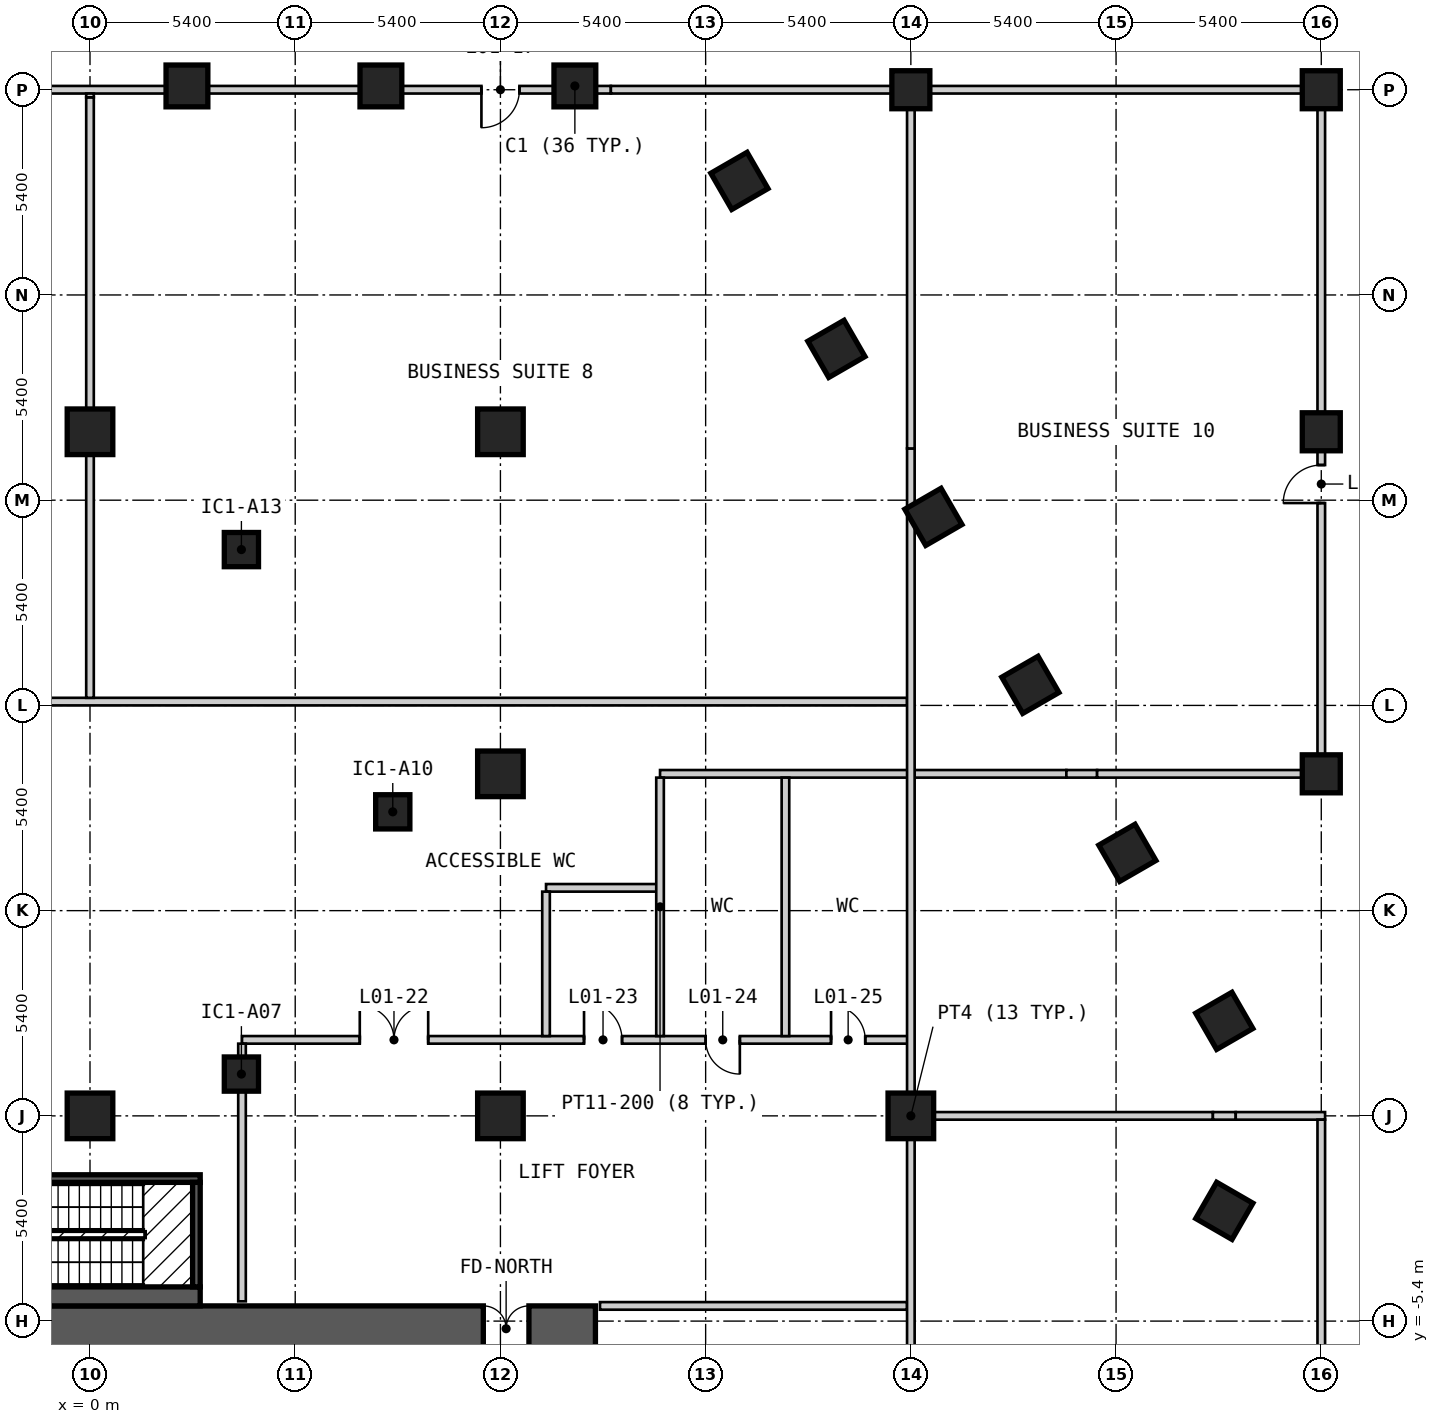
"""IFC4 building model, lengths in metres.
Left out: names, types, materials, properties, quantities, classifications, styles, units other than length and angle.
Written with IfcOpenShell. Run it as: python <this file> out.ifc"""

import sys

from ifc_helpers import new_model, si_unit, direction, frame, frame_2d, origin, origin_2d, place, context, subcontext, project, spatial, rectangle, extrude, element, fill, save


model = new_model("IFC4")
c1 = context("Model", 3, precision=1e-05, world=origin(), true_north=direction((0.0, 1.0)))
c2 = subcontext(c1, "Body", "Model", "MODEL_VIEW")
j1 = project(units=[si_unit("LENGTHUNIT", "METRE"), si_unit("PLANEANGLEUNIT", "RADIAN")], contexts=[c1])
p1 = place(None, origin())
s1 = spatial("IfcSite", under=j1, at=p1, CompositionType="ELEMENT")
p2 = place(p1, origin())
s2 = spatial("IfcBuilding", under=s1, at=p2, CompositionType="ELEMENT")
p3 = place(p2, frame((0.0, 0.0, 5.0)))
s3 = spatial("IfcBuildingStorey", under=s2, at=p3, CompositionType="ELEMENT", Elevation=5.0)
for number, where, z_axis, x_axis in (
    (1, (12.759, 27.1, 0.0), (0.0, 0.0, 1.0), (-1.0, 0.0, 0.0)),
    (2, (7.655, 27.1, 0.0), (0.0, 0.0, 1.0), (-1.0, 0.0, 0.0)),
    (3, (2.551, 27.1, 0.0), (0.0, 0.0, 1.0), (-1.0, 0.0, 0.0)),
    (4, (29.849, -2.499, 0.0), (0.0, 0.0, 1.0), (0.5, 0.866, 0.0)),
    (5, (29.848, 2.5, 0.0), (0.0, 0.0, 1.0), (-0.5, 0.866, 0.0)),
    (6, (27.297, 6.921, 0.0), (0.0, 0.0, 1.0), (-0.5, 0.866, 0.0)),
    (7, (24.745, 11.341, 0.0), (0.0, 0.0, 1.0), (-0.5, 0.866, 0.0)),
    (8, (22.193, 15.761, 0.0), (0.0, 0.0, 1.0), (-0.5, 0.866, 0.0)),
    (9, (19.641, 20.181, 0.0), (0.0, 0.0, 1.0), (-0.5, 0.866, 0.0)),
    (10, (17.089, 24.601, 0.0), (0.0, 0.0, 1.0), (-0.5, 0.866, 0.0)),
):
    element("IfcColumn", number, at=place(p3, frame(where, z_axis=z_axis, x_axis=x_axis)), inside=s3, PredefinedType="COLUMN", context=c2, shape_type="SweptSolid", body=[
        extrude(rectangle(XDim=1.1, YDim=1.1, at=origin_2d()), origin(), (0.0, 0.0, 1.0), 4.0),
    ])
for number, where, z_axis, x_axis in (
    (11, (3.984, 1.1, 0.0), (0.0, 0.0, 1.0), (1.0, 0.0, 0.0)),
    (12, (7.967, 8.0, 0.0), (0.0, 0.0, 1.0), (1.0, 0.0, 0.0)),
    (13, (3.984, 14.9, 0.0), (0.0, 0.0, 1.0), (1.0, 0.0, 0.0)),
):
    element("IfcColumn", number, at=place(p3, frame(where, z_axis=z_axis, x_axis=x_axis)), inside=s3, PredefinedType="COLUMN", context=c2, shape_type="SweptSolid", body=[
        extrude(rectangle(XDim=0.9, YDim=0.9, at=origin_2d()), origin(), (0.0, 0.0, 1.0), 4.0),
    ])
for number, where, z_axis, x_axis in (
    (14, (0.0, 0.0, 0.0), (0.0, 0.0, 1.0), (1.0, 0.0, 0.0)),
    (15, (0.0, 18.0, 0.0), (0.0, 0.0, 1.0), (1.0, 0.0, 0.0)),
    (16, (10.8, 0.0, 0.0), (0.0, 0.0, 1.0), (1.0, 0.0, 0.0)),
    (17, (10.8, 9.0, 0.0), (0.0, 0.0, 1.0), (1.0, 0.0, 0.0)),
    (18, (10.8, 18.0, 0.0), (0.0, 0.0, 1.0), (1.0, 0.0, 0.0)),
    (19, (21.6, 0.0, 0.0), (0.0, 0.0, 1.0), (1.0, 0.0, 0.0)),
):
    element("IfcColumn", number, at=place(p3, frame(where, z_axis=z_axis, x_axis=x_axis)), inside=s3, PredefinedType="COLUMN", context=c2, shape_type="SweptSolid", body=[
        extrude(rectangle(XDim=1.2, YDim=1.2, at=origin_2d()), origin(), (0.0, 0.0, 1.0), 4.0),
    ])
for number, where, z_axis, x_axis in (
    (20, (21.6, 27.0, 0.0), (0.0, 0.0, 1.0), (1.0, 0.0, 0.0)),
    (21, (32.4, 9.0, 0.0), (0.0, 0.0, 1.0), (1.0, 0.0, 0.0)),
    (22, (32.4, 18.0, 0.0), (0.0, 0.0, 1.0), (1.0, 0.0, 0.0)),
    (23, (32.4, 27.0, 0.0), (0.0, 0.0, 1.0), (1.0, 0.0, 0.0)),
):
    element("IfcColumn", number, at=place(p3, frame(where, z_axis=z_axis, x_axis=x_axis)), inside=s3, PredefinedType="COLUMN", context=c2, shape_type="SweptSolid", body=[
        extrude(rectangle(XDim=1.0, YDim=1.0, at=origin_2d()), origin(), (0.0, 0.0, 1.0), 4.0),
    ])
p4 = place(p3, frame((-13.3, -5.6, 0.0), z_axis=(0.0, 0.0, 1.0), x_axis=(1.0, 0.0, 0.0)))
e24 = element("IfcWall", 24, at=p4, inside=s3, PredefinedType="SHEAR", context=c2, shape_type="SweptSolid", body=[
    extrude(rectangle(XDim=26.6, YDim=1.2, at=frame_2d((13.3, 0.0))), origin(), (0.0, 0.0, 1.0), 3.5),
])
p5 = place(p4, frame((23.65, 0.0, 0.0)))
e25 = element("IfcOpeningElement", 25, at=p5, cuts=e24, PredefinedType="OPENING", context=c2, shape_type="SweptSolid", body=[
    extrude(rectangle(XDim=1.2, YDim=2.1, at=frame_2d((0.6, 1.05))), frame((0.0, 0.61, 0.0), z_axis=(0.0, -1.0, 0.0), x_axis=(1.0, 0.0, 0.0)), (0.0, 0.0, 1.0), 1.22),
])
p6 = place(p3, frame((-2.9, -4.75, 0.0), z_axis=(0.0, 0.0, 1.0), x_axis=(1.0, 0.0, 0.0)))
e26 = element("IfcWall", 26, at=p6, inside=s3, PredefinedType="SOLIDWALL", context=c2, shape_type="SweptSolid", body=[
    extrude(rectangle(XDim=5.8, YDim=0.5, at=frame_2d((2.9, 0.0))), origin(), (0.0, 0.0, 1.0), 3.5),
])
p7 = place(p3, frame((-2.9, -1.65, 0.0), z_axis=(0.0, 0.0, 1.0), x_axis=(1.0, 0.0, 0.0)))
e27 = element("IfcWall", 27, at=p7, inside=s3, PredefinedType="SOLIDWALL", context=c2, shape_type="SweptSolid", body=[
    extrude(rectangle(XDim=5.8, YDim=0.2, at=frame_2d((2.9, 0.0))), origin(), (0.0, 0.0, 1.0), 3.5),
])
p8 = place(p7, frame((0.3, 0.0, 0.0)))
e28 = element("IfcOpeningElement", 28, at=p8, cuts=e27, PredefinedType="OPENING", context=c2, shape_type="SweptSolid", body=[
    extrude(rectangle(XDim=1.2, YDim=2.1, at=frame_2d((0.6, 1.05))), frame((0.0, 0.11, 0.0), z_axis=(0.0, -1.0, 0.0), x_axis=(1.0, 0.0, 0.0)), (0.0, 0.0, 1.0), 0.22),
])
p9 = place(p3, frame((2.8, -4.5, 0.0), z_axis=(0.0, 0.0, 1.0), x_axis=(0.0, 1.0, 0.0)))
e29 = element("IfcWall", 29, at=p9, inside=s3, PredefinedType="SOLIDWALL", context=c2, shape_type="SweptSolid", body=[
    extrude(rectangle(XDim=2.75, YDim=0.2, at=frame_2d((1.375, 0.0))), origin(), (0.0, 0.0, 1.0), 3.5),
])
p10 = place(p3, frame((13.42, -5.0, 0.0), z_axis=(0.0, 0.0, 1.0), x_axis=(1.0, 0.0, 0.0)))
e30 = element("IfcWall", 30, at=p10, inside=s3, PredefinedType="PARTITIONING", context=c2, shape_type="SweptSolid", body=[
    extrude(rectangle(XDim=8.08, YDim=0.2, at=frame_2d((4.04, 0.0))), origin(), (0.0, 0.0, 1.0), 3.5),
])
p11 = place(p3, frame((21.7, 0.0, 0.0), z_axis=(0.0, 0.0, 1.0), x_axis=(1.0, 0.0, 0.0)))
e31 = element("IfcWall", 31, at=p11, inside=s3, PredefinedType="PARTITIONING", context=c2, shape_type="SweptSolid", body=[
    extrude(rectangle(XDim=7.848, YDim=0.2, at=frame_2d((3.924, 0.0))), origin(), (0.0, 0.0, 1.0), 3.5),
])
p12 = place(p3, frame((29.548, 0.0, 0.0), z_axis=(0.0, 0.0, 1.0), x_axis=(1.0, 0.0, 0.0)))
e32 = element("IfcWall", 32, at=p12, inside=s3, PredefinedType="PARTITIONING", context=c2, shape_type="SweptSolid", body=[
    extrude(rectangle(XDim=0.601, YDim=0.2, at=frame_2d((0.3, 0.0))), origin(), (0.0, 0.0, 1.0), 2.77),
])
p13 = place(p3, frame((30.149, 0.0, 0.0), z_axis=(0.0, 0.0, 1.0), x_axis=(1.0, 0.0, 0.0)))
e33 = element("IfcWall", 33, at=p13, inside=s3, PredefinedType="PARTITIONING", context=c2, shape_type="SweptSolid", body=[
    extrude(rectangle(XDim=2.351, YDim=0.2, at=frame_2d((1.176, 0.0))), origin(), (0.0, 0.0, 1.0), 3.5),
])
p14 = place(p3, frame((4.0, 2.0, 0.0), z_axis=(0.0, 0.0, 1.0), x_axis=(1.0, 0.0, 0.0)))
e34 = element("IfcWall", 34, at=p14, inside=s3, PredefinedType="PARTITIONING", context=c2, shape_type="SweptSolid", body=[
    extrude(rectangle(XDim=17.6, YDim=0.2, at=frame_2d((8.8, 0.0))), origin(), (0.0, 0.0, 1.0), 3.5),
])
p15 = place(p14, frame((3.099, 0.0, 0.0)))
e35 = element("IfcOpeningElement", 35, at=p15, cuts=e34, PredefinedType="OPENING", context=c2, shape_type="SweptSolid", body=[
    extrude(rectangle(XDim=1.8, YDim=2.1, at=frame_2d((0.9, 1.05))), frame((0.0, 0.11, 0.0), z_axis=(0.0, -1.0, 0.0), x_axis=(1.0, 0.0, 0.0)), (0.0, 0.0, 1.0), 0.22),
])
p16 = place(p14, frame((9.0, 0.0, 0.0)))
e36 = element("IfcOpeningElement", 36, at=p16, cuts=e34, PredefinedType="OPENING", context=c2, shape_type="SweptSolid", body=[
    extrude(rectangle(XDim=1.0, YDim=2.1, at=frame_2d((0.5, 1.05))), frame((0.0, 0.11, 0.0), z_axis=(0.0, -1.0, 0.0), x_axis=(1.0, 0.0, 0.0)), (0.0, 0.0, 1.0), 0.22),
])
p17 = place(p14, frame((12.2, 0.0, 0.0)))
e37 = element("IfcOpeningElement", 37, at=p17, cuts=e34, PredefinedType="OPENING", context=c2, shape_type="SweptSolid", body=[
    extrude(rectangle(XDim=0.9, YDim=2.1, at=frame_2d((0.45, 1.05))), frame((0.0, 0.11, 0.0), z_axis=(0.0, -1.0, 0.0), x_axis=(1.0, 0.0, 0.0)), (0.0, 0.0, 1.0), 0.22),
])
p18 = place(p14, frame((15.5, 0.0, 0.0)))
e38 = element("IfcOpeningElement", 38, at=p18, cuts=e34, PredefinedType="OPENING", context=c2, shape_type="SweptSolid", body=[
    extrude(rectangle(XDim=0.9, YDim=2.1, at=frame_2d((0.45, 1.05))), frame((0.0, 0.11, 0.0), z_axis=(0.0, -1.0, 0.0), x_axis=(1.0, 0.0, 0.0)), (0.0, 0.0, 1.0), 0.22),
])
p19 = place(p3, frame((12.0, 6.0, 0.0), z_axis=(0.0, 0.0, 1.0), x_axis=(1.0, 0.0, 0.0)))
e39 = element("IfcWall", 39, at=p19, inside=s3, PredefinedType="PARTITIONING", context=c2, shape_type="SweptSolid", body=[
    extrude(rectangle(XDim=3.0, YDim=0.2, at=frame_2d((1.5, 0.0))), origin(), (0.0, 0.0, 1.0), 3.5),
])
p20 = place(p3, frame((15.0, 9.0, 0.0), z_axis=(0.0, 0.0, 1.0), x_axis=(1.0, 0.0, 0.0)))
e40 = element("IfcWall", 40, at=p20, inside=s3, PredefinedType="PARTITIONING", context=c2, shape_type="SweptSolid", body=[
    extrude(rectangle(XDim=6.6, YDim=0.2, at=frame_2d((3.3, 0.0))), origin(), (0.0, 0.0, 1.0), 3.5),
])
p21 = place(p3, frame((21.7, 9.0, 0.0), z_axis=(0.0, 0.0, 1.0), x_axis=(1.0, 0.0, 0.0)))
e41 = element("IfcWall", 41, at=p21, inside=s3, PredefinedType="PARTITIONING", context=c2, shape_type="SweptSolid", body=[
    extrude(rectangle(XDim=3.992, YDim=0.2, at=frame_2d((1.996, 0.0))), origin(), (0.0, 0.0, 1.0), 3.5),
])
p22 = place(p3, frame((25.692, 9.0, 0.0), z_axis=(0.0, 0.0, 1.0), x_axis=(1.0, 0.0, 0.0)))
e42 = element("IfcWall", 42, at=p22, inside=s3, PredefinedType="PARTITIONING", context=c2, shape_type="SweptSolid", body=[
    extrude(rectangle(XDim=0.809, YDim=0.2, at=frame_2d((0.405, 0.0))), origin(), (0.0, 0.0, 1.0), 2.77),
])
p23 = place(p3, frame((26.501, 9.0, 0.0), z_axis=(0.0, 0.0, 1.0), x_axis=(1.0, 0.0, 0.0)))
e43 = element("IfcWall", 43, at=p23, inside=s3, PredefinedType="PARTITIONING", context=c2, shape_type="SweptSolid", body=[
    extrude(rectangle(XDim=5.999, YDim=0.2, at=frame_2d((3.0, 0.0))), origin(), (0.0, 0.0, 1.0), 3.5),
])
p24 = place(p3, frame((-21.5, 10.9, 0.0), z_axis=(0.0, 0.0, 1.0), x_axis=(1.0, 0.0, 0.0)))
e44 = element("IfcWall", 44, at=p24, inside=s3, PredefinedType="PARTITIONING", context=c2, shape_type="SweptSolid", body=[
    extrude(rectangle(XDim=43.0, YDim=0.2, at=frame_2d((21.5, 0.0))), origin(), (0.0, 0.0, 1.0), 3.5),
])
for number, where, z_axis, x_axis in (
    (45, (-2.553, 27.0, 0.0), (0.0, 0.0, 1.0), (1.0, 0.0, 0.0)),
    (46, (2.551, 27.0, 0.0), (0.0, 0.0, 1.0), (1.0, 0.0, 0.0)),
):
    element("IfcWall", number, at=place(p3, frame(where, z_axis=z_axis, x_axis=x_axis)), inside=s3, PredefinedType="PARTITIONING", context=c2, shape_type="SweptSolid", body=[
        extrude(rectangle(XDim=5.104, YDim=0.2, at=frame_2d((2.552, 0.0))), origin(), (0.0, 0.0, 1.0), 2.77),
    ])
p25 = place(p3, frame((7.655, 27.0, 0.0), z_axis=(0.0, 0.0, 1.0), x_axis=(1.0, 0.0, 0.0)))
e47 = element("IfcWall", 47, at=p25, inside=s3, PredefinedType="PARTITIONING", context=c2, shape_type="SweptSolid", body=[
    extrude(rectangle(XDim=4.989, YDim=0.2, at=frame_2d((2.495, 0.0))), origin(), (0.0, 0.0, 1.0), 2.77),
])
p26 = place(p25, frame((3.645, 0.0, 0.0), z_axis=(0.0, 0.0, 1.0), x_axis=(-1.0, 0.0, 0.0)))
e48 = element("IfcOpeningElement", 48, at=p26, cuts=e47, PredefinedType="OPENING", context=c2, shape_type="SweptSolid", body=[
    extrude(rectangle(XDim=1.0, YDim=2.1, at=frame_2d((0.5, 1.05))), frame((0.0, 0.11, 0.0), z_axis=(0.0, -1.0, 0.0), x_axis=(1.0, 0.0, 0.0)), (0.0, 0.0, 1.0), 0.22),
])
p27 = place(p3, frame((12.644, 27.0, 0.0), z_axis=(0.0, 0.0, 1.0), x_axis=(1.0, 0.0, 0.0)))
e49 = element("IfcWall", 49, at=p27, inside=s3, PredefinedType="PARTITIONING", context=c2, shape_type="SweptSolid", body=[
    extrude(rectangle(XDim=0.115, YDim=0.2, at=frame_2d((0.058, 0.0))), origin(), (0.0, 0.0, 1.0), 2.77),
])
p28 = place(p3, frame((12.759, 27.0, 0.0), z_axis=(0.0, 0.0, 1.0), x_axis=(1.0, 0.0, 0.0)))
e50 = element("IfcWall", 50, at=p28, inside=s3, PredefinedType="PARTITIONING", context=c2, shape_type="SweptSolid", body=[
    extrude(rectangle(XDim=0.947, YDim=0.2, at=frame_2d((0.474, 0.0))), origin(), (0.0, 0.0, 1.0), 2.77),
])
p29 = place(p3, frame((13.706, 27.0, 0.0), z_axis=(0.0, 0.0, 1.0), x_axis=(1.0, 0.0, 0.0)))
e51 = element("IfcWall", 51, at=p29, inside=s3, PredefinedType="PARTITIONING", context=c2, shape_type="SweptSolid", body=[
    extrude(rectangle(XDim=18.794, YDim=0.2, at=frame_2d((9.397, 0.0))), origin(), (0.0, 0.0, 1.0), 3.5),
])
p30 = place(p3, frame((0.0, 11.0, 0.0), z_axis=(0.0, 0.0, 1.0), x_axis=(0.0, 1.0, 0.0)))
e52 = element("IfcWall", 52, at=p30, inside=s3, PredefinedType="PARTITIONING", context=c2, shape_type="SweptSolid", body=[
    extrude(rectangle(XDim=15.8, YDim=0.2, at=frame_2d((7.9, 0.0))), origin(), (0.0, 0.0, 1.0), 3.5),
])
p31 = place(p3, frame((0.0, 26.8, 0.0), z_axis=(0.0, 0.0, 1.0), x_axis=(0.0, 1.0, 0.0)))
e53 = element("IfcWall", 53, at=p31, inside=s3, PredefinedType="PARTITIONING", context=c2, shape_type="SweptSolid", body=[
    extrude(rectangle(XDim=0.1, YDim=0.2, at=frame_2d((0.05, 0.0))), origin(), (0.0, 0.0, 1.0), 2.77),
])
p32 = place(p3, frame((4.0, -4.88, 0.0), z_axis=(0.0, 0.0, 1.0), x_axis=(0.0, 1.0, 0.0)))
e54 = element("IfcWall", 54, at=p32, inside=s3, PredefinedType="PARTITIONING", context=c2, shape_type="SweptSolid", body=[
    extrude(rectangle(XDim=6.78, YDim=0.2, at=frame_2d((3.39, 0.0))), origin(), (0.0, 0.0, 1.0), 3.5),
])
p33 = place(p3, frame((12.0, 2.1, 0.0), z_axis=(0.0, 0.0, 1.0), x_axis=(0.0, 1.0, 0.0)))
e55 = element("IfcWall", 55, at=p33, inside=s3, PredefinedType="PARTITIONING", context=c2, shape_type="SweptSolid", body=[
    extrude(rectangle(XDim=3.8, YDim=0.2, at=frame_2d((1.9, 0.0))), origin(), (0.0, 0.0, 1.0), 3.5),
])
for number, where, z_axis, x_axis in (
    (56, (15.0, 2.1, 0.0), (0.0, 0.0, 1.0), (0.0, 1.0, 0.0)),
    (57, (18.3, 2.1, 0.0), (0.0, 0.0, 1.0), (0.0, 1.0, 0.0)),
):
    element("IfcWall", number, at=place(p3, frame(where, z_axis=z_axis, x_axis=x_axis)), inside=s3, PredefinedType="PARTITIONING", context=c2, shape_type="SweptSolid", body=[
        extrude(rectangle(XDim=6.8, YDim=0.2, at=frame_2d((3.4, 0.0))), origin(), (0.0, 0.0, 1.0), 3.5),
    ])
p34 = place(p3, frame((21.6, -16.015, 0.0), z_axis=(0.0, 0.0, 1.0), x_axis=(0.0, 1.0, 0.0)))
e58 = element("IfcWall", 58, at=p34, inside=s3, PredefinedType="PARTITIONING", context=c2, shape_type="SweptSolid", body=[
    extrude(rectangle(XDim=32.03, YDim=0.2, at=frame_2d((16.015, 0.0))), origin(), (0.0, 0.0, 1.0), 3.5),
])
p35 = place(p3, frame((21.6, 16.015, 0.0), z_axis=(0.0, 0.0, 1.0), x_axis=(0.0, 1.0, 0.0)))
e59 = element("IfcWall", 59, at=p35, inside=s3, PredefinedType="PARTITIONING", context=c2, shape_type="SweptSolid", body=[
    extrude(rectangle(XDim=1.546, YDim=0.2, at=frame_2d((0.773, 0.0))), origin(), (0.0, 0.0, 1.0), 2.77),
])
p36 = place(p3, frame((21.6, 17.561, 0.0), z_axis=(0.0, 0.0, 1.0), x_axis=(0.0, 1.0, 0.0)))
e60 = element("IfcWall", 60, at=p36, inside=s3, PredefinedType="PARTITIONING", context=c2, shape_type="SweptSolid", body=[
    extrude(rectangle(XDim=9.339, YDim=0.2, at=frame_2d((4.669, 0.0))), origin(), (0.0, 0.0, 1.0), 3.5),
])
p37 = place(p3, frame((32.4, -26.2, 0.0), z_axis=(0.0, 0.0, 1.0), x_axis=(0.0, 1.0, 0.0)))
e61 = element("IfcWall", 61, at=p37, inside=s3, PredefinedType="PARTITIONING", context=c2, shape_type="SweptSolid", body=[
    extrude(rectangle(XDim=26.1, YDim=0.2, at=frame_2d((13.05, 0.0))), origin(), (0.0, 0.0, 1.0), 3.5),
])
p38 = place(p37, frame((15.323, 0.0, 0.0)))
e62 = element("IfcOpeningElement", 62, at=p38, cuts=e61, PredefinedType="OPENING", context=c2, shape_type="SweptSolid", body=[
    extrude(rectangle(XDim=1.0, YDim=2.1, at=frame_2d((0.5, 1.05))), frame((0.0, 0.11, 0.0), z_axis=(0.0, -1.0, 0.0), x_axis=(1.0, 0.0, 0.0)), (0.0, 0.0, 1.0), 0.22),
])
p39 = place(p3, frame((32.4, 9.1, 0.0), z_axis=(0.0, 0.0, 1.0), x_axis=(0.0, 1.0, 0.0)))
e63 = element("IfcWall", 63, at=p39, inside=s3, PredefinedType="PARTITIONING", context=c2, shape_type="SweptSolid", body=[
    extrude(rectangle(XDim=17.8, YDim=0.2, at=frame_2d((8.9, 0.0))), origin(), (0.0, 0.0, 1.0), 3.5),
])
p40 = place(p39, frame((7.025, 0.0, 0.0)))
e64 = element("IfcOpeningElement", 64, at=p40, cuts=e63, PredefinedType="OPENING", context=c2, shape_type="SweptSolid", body=[
    extrude(rectangle(XDim=1.0, YDim=2.1, at=frame_2d((0.5, 1.05))), frame((0.0, 0.11, 0.0), z_axis=(0.0, -1.0, 0.0), x_axis=(1.0, 0.0, 0.0)), (0.0, 0.0, 1.0), 0.22),
])
p41 = place(p26, origin())
e65 = element("IfcDoor", 65, at=p41, inside=s3, OperationType="SINGLE_SWING_RIGHT", PredefinedType="DOOR", context=c2, shape_type="SweptSolid", body=[
    extrude(rectangle(XDim=1.0, YDim=2.1, at=frame_2d((0.5, 1.05))), frame((0.0, 0.025, 0.0), z_axis=(0.0, -1.0, 0.0), x_axis=(1.0, 0.0, 0.0)), (0.0, 0.0, 1.0), 0.05),
])
fill(e48, e65)
p42 = place(p40, origin())
e66 = element("IfcDoor", 66, at=p42, inside=s3, OperationType="SINGLE_SWING_LEFT", PredefinedType="DOOR", context=c2, shape_type="SweptSolid", body=[
    extrude(rectangle(XDim=1.0, YDim=2.1, at=frame_2d((0.5, 1.05))), frame((0.0, 0.025, 0.0), z_axis=(0.0, -1.0, 0.0), x_axis=(1.0, 0.0, 0.0)), (0.0, 0.0, 1.0), 0.05),
])
fill(e64, e66)
p43 = place(p15, origin())
e67 = element("IfcDoor", 67, at=p43, inside=s3, OperationType="DOUBLE_DOOR_SINGLE_SWING", PredefinedType="DOOR", context=c2, shape_type="SweptSolid", body=[
    extrude(rectangle(XDim=1.8, YDim=2.1, at=frame_2d((0.9, 1.05))), frame((0.0, 0.025, 0.0), z_axis=(0.0, -1.0, 0.0), x_axis=(1.0, 0.0, 0.0)), (0.0, 0.0, 1.0), 0.05),
])
fill(e35, e67)
p44 = place(p16, origin())
e68 = element("IfcDoor", 68, at=p44, inside=s3, OperationType="SINGLE_SWING_LEFT", PredefinedType="DOOR", context=c2, shape_type="SweptSolid", body=[
    extrude(rectangle(XDim=1.0, YDim=2.1, at=frame_2d((0.5, 1.05))), frame((0.0, 0.025, 0.0), z_axis=(0.0, -1.0, 0.0), x_axis=(1.0, 0.0, 0.0)), (0.0, 0.0, 1.0), 0.05),
])
fill(e36, e68)
p45 = place(p17, origin())
e69 = element("IfcDoor", 69, at=p45, inside=s3, OperationType="SINGLE_SWING_RIGHT", PredefinedType="DOOR", context=c2, shape_type="SweptSolid", body=[
    extrude(rectangle(XDim=0.9, YDim=2.1, at=frame_2d((0.45, 1.05))), frame((0.0, 0.025, 0.0), z_axis=(0.0, -1.0, 0.0), x_axis=(1.0, 0.0, 0.0)), (0.0, 0.0, 1.0), 0.05),
])
fill(e37, e69)
p46 = place(p18, origin())
e70 = element("IfcDoor", 70, at=p46, inside=s3, OperationType="SINGLE_SWING_LEFT", PredefinedType="DOOR", context=c2, shape_type="SweptSolid", body=[
    extrude(rectangle(XDim=0.9, YDim=2.1, at=frame_2d((0.45, 1.05))), frame((0.0, 0.025, 0.0), z_axis=(0.0, -1.0, 0.0), x_axis=(1.0, 0.0, 0.0)), (0.0, 0.0, 1.0), 0.05),
])
fill(e38, e70)
p47 = place(p5, origin())
e71 = element("IfcDoor", 71, at=p47, inside=s3, OperationType="DOUBLE_DOOR_SINGLE_SWING", PredefinedType="DOOR", context=c2, shape_type="SweptSolid", body=[
    extrude(rectangle(XDim=1.2, YDim=2.1, at=frame_2d((0.6, 1.05))), frame((0.0, 0.025, 0.0), z_axis=(0.0, -1.0, 0.0), x_axis=(1.0, 0.0, 0.0)), (0.0, 0.0, 1.0), 0.05),
])
fill(e25, e71)
save(model, sys.argv[1])
